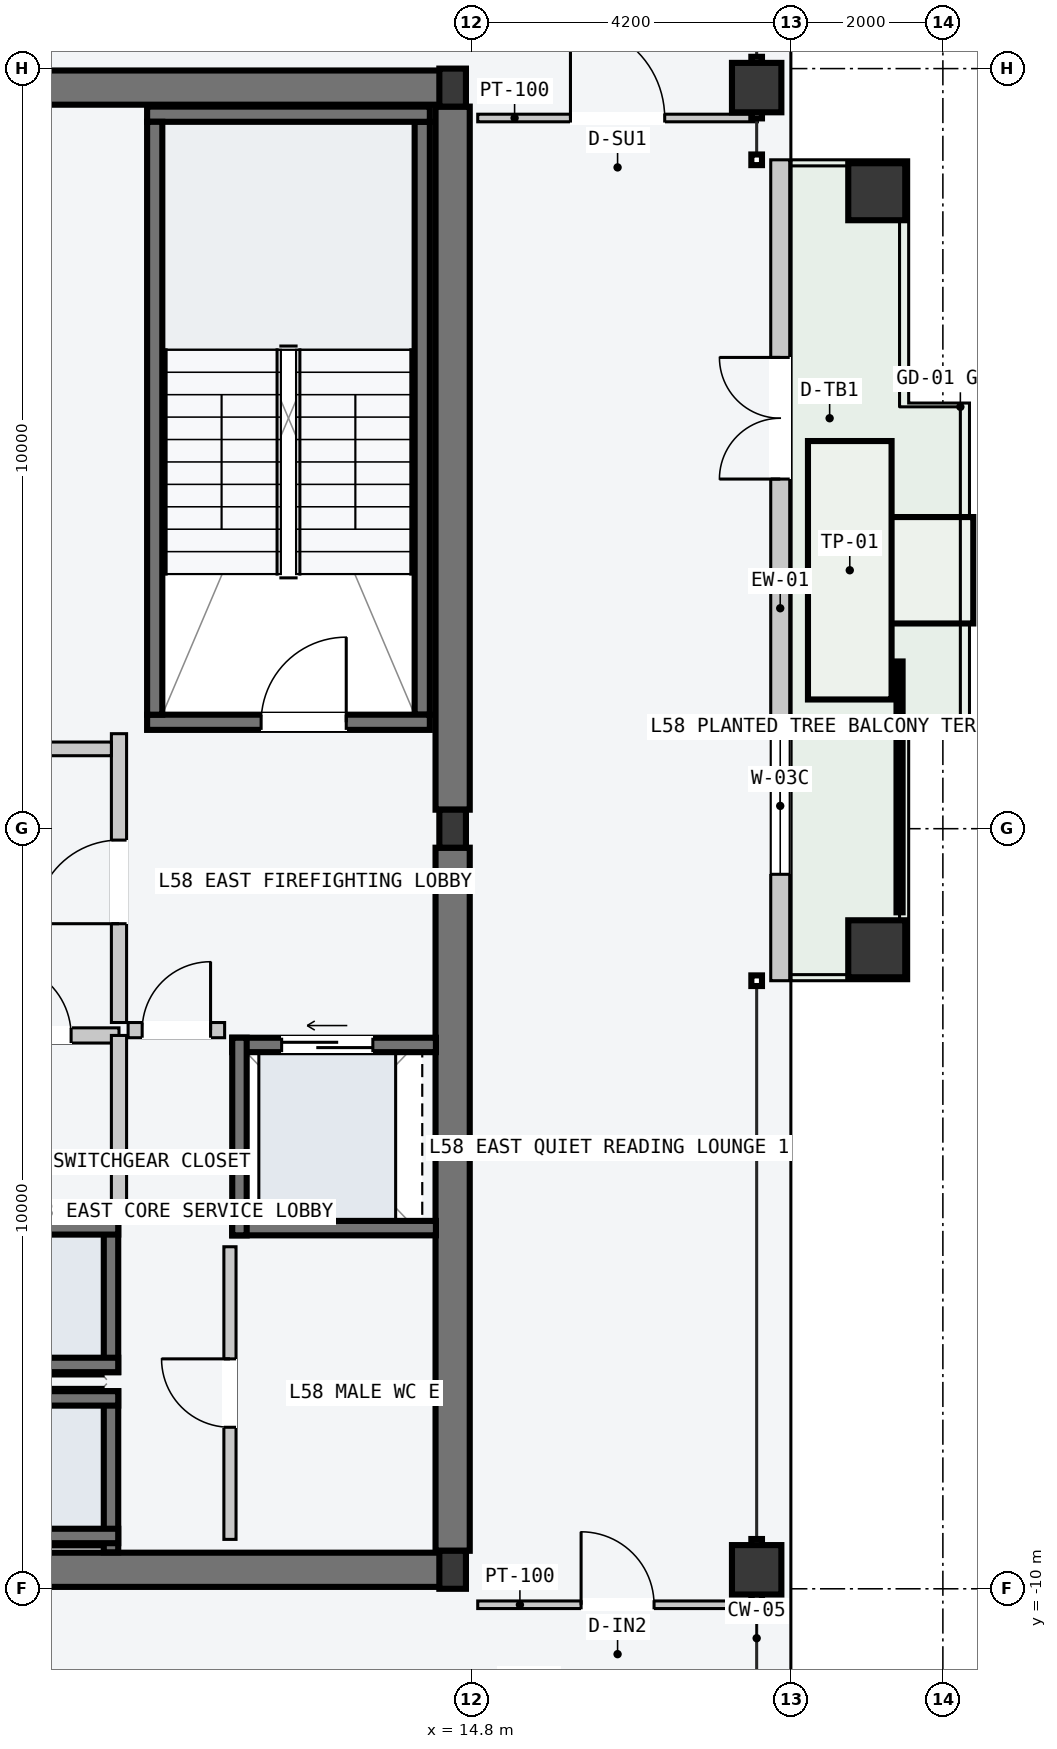
"""IFC4 building model, lengths in metres.
Left out: names, types, materials, properties, quantities, classifications, styles, units other than length and angle.
Written with IfcOpenShell. Run it as: python <this file> out.ifc"""

import sys

from ifc_helpers import new_model, si_unit, direction, frame, frame_2d, origin, origin_2d, place, context, subcontext, project, spatial, rectangle, hollow_rectangle, i_section, extrude, element, fill, save


model = new_model("IFC4")
c1 = context("Model", 3, precision=1e-05, world=origin(), true_north=direction((0.0, 1.0)))
c2 = subcontext(c1, "Body", "Model", "MODEL_VIEW")
j1 = project(units=[si_unit("LENGTHUNIT", "METRE"), si_unit("PLANEANGLEUNIT", "RADIAN")], contexts=[c1])
p1 = place(None, origin())
s1 = spatial("IfcSite", under=j1, at=p1, CompositionType="ELEMENT")
p2 = place(p1, origin())
s2 = spatial("IfcBuilding", under=s1, at=p2, CompositionType="ELEMENT")
p3 = place(p2, frame((0.0, 0.0, 222.0)))
s3 = spatial("IfcBuildingStorey", under=s2, at=p3, CompositionType="ELEMENT", Elevation=222.0)
for number, where, z_axis, x_axis in (
    (1, (8.07, -9.75, -0.2), (0.0, 0.0, 1.0), (1.0, 0.0, 0.0)),
    (2, (8.07, 9.75, -0.2), (0.0, 0.0, 1.0), (1.0, 0.0, 0.0)),
):
    element("IfcWall", number, at=place(p3, frame(where, z_axis=z_axis, x_axis=x_axis)), inside=s3, PredefinedType="SHEAR", context=c2, shape_type="SweptSolid", body=[
        extrude(rectangle(XDim=6.46, YDim=0.45, at=frame_2d((3.23, 0.0))), origin(), (0.0, 0.0, 1.0), 3.6),
    ])
for number, where, z_axis, x_axis in (
    (3, (14.55, -9.5, -0.2), (0.0, 0.0, 1.0), (0.0, 1.0, 0.0)),
    (4, (14.55, 0.25, -0.2), (0.0, 0.0, 1.0), (0.0, 1.0, 0.0)),
):
    element("IfcWall", number, at=place(p3, frame(where, z_axis=z_axis, x_axis=x_axis)), inside=s3, PredefinedType="SHEAR", context=c2, shape_type="SweptSolid", body=[
        extrude(rectangle(XDim=9.25, YDim=0.45, at=frame_2d((4.625, 0.0))), origin(), (0.0, 0.0, 1.0), 3.6),
    ])
p4 = place(p3, frame((14.15, 1.5, -0.2), z_axis=(0.0, 0.0, 1.0), x_axis=(0.0, 1.0, 0.0)))
e5 = element("IfcWall", 5, at=p4, inside=s3, PredefinedType="SOLIDWALL", context=c2, shape_type="SweptSolid", body=[
    extrude(rectangle(XDim=7.8, YDim=0.2, at=frame_2d((3.9, 0.0))), origin(), (0.0, 0.0, 1.0), 3.6),
])
p5 = place(p3, frame((10.53, 1.4, -0.2), z_axis=(0.0, 0.0, 1.0), x_axis=(1.0, 0.0, 0.0)))
e6 = element("IfcWall", 6, at=p5, inside=s3, PredefinedType="SOLIDWALL", context=c2, shape_type="SweptSolid", body=[
    extrude(rectangle(XDim=3.72, YDim=0.2, at=frame_2d((1.86, 0.0))), origin(), (0.0, 0.0, 1.0), 3.6),
])
p6 = place(p5, frame((1.5, 0.0, 0.2)))
e7 = element("IfcOpeningElement", 7, at=p6, cuts=e6, PredefinedType="OPENING", context=c2, shape_type="SweptSolid", body=[
    extrude(rectangle(XDim=1.12, YDim=2.18, at=frame_2d((0.56, 1.09))), frame((0.0, 0.11, 0.0), z_axis=(0.0, -1.0, 0.0), x_axis=(1.0, 0.0, 0.0)), (0.0, 0.0, 1.0), 0.22),
])
p7 = place(p3, frame((10.53, 9.4, -0.2), z_axis=(0.0, 0.0, 1.0), x_axis=(1.0, 0.0, 0.0)))
e8 = element("IfcWall", 8, at=p7, inside=s3, PredefinedType="SOLIDWALL", context=c2, shape_type="SweptSolid", body=[
    extrude(rectangle(XDim=3.72, YDim=0.2, at=frame_2d((1.86, 0.0))), origin(), (0.0, 0.0, 1.0), 3.6),
])
p8 = place(p3, frame((10.63, 1.5, -0.2), z_axis=(0.0, 0.0, 1.0), x_axis=(0.0, 1.0, 0.0)))
e9 = element("IfcWall", 9, at=p8, inside=s3, PredefinedType="SOLIDWALL", context=c2, shape_type="SweptSolid", body=[
    extrude(rectangle(XDim=7.8, YDim=0.2, at=frame_2d((3.9, 0.0))), origin(), (0.0, 0.0, 1.0), 3.6),
])
for number, where, z_axis, x_axis in (
    (10, (14.55, -9.75, 0.0), (0.0, 0.0, 1.0), (1.0, 0.0, 0.0)),
    (11, (14.55, 0.0, 0.0), (0.0, 0.0, 1.0), (1.0, 0.0, 0.0)),
    (12, (14.55, 9.75, 0.0), (0.0, 0.0, 1.0), (1.0, 0.0, 0.0)),
):
    element("IfcColumn", number, at=place(p3, frame(where, z_axis=z_axis, x_axis=x_axis)), inside=s3, PredefinedType="COLUMN", context=c2, shape_type="SweptSolid", body=[
        extrude(i_section(OverallWidth=0.35, OverallDepth=0.5, WebThickness=0.02, FlangeThickness=0.032, at=origin_2d()), origin(), (0.0, 0.0, 1.0), 3.6),
    ])
for number, where, z_axis, x_axis in (
    (13, (18.55, -9.75, 0.0), (0.0, 0.0, 1.0), (0.0, 1.0, 0.0)),
    (14, (18.55, 9.75, 0.0), (0.0, 0.0, 1.0), (0.0, 1.0, 0.0)),
):
    element("IfcColumn", number, at=place(p3, frame(where, z_axis=z_axis, x_axis=x_axis)), inside=s3, PredefinedType="COLUMN", context=c2, shape_type="SweptSolid", body=[
        extrude(hollow_rectangle(XDim=0.65, YDim=0.65, WallThickness=0.028, at=origin_2d()), origin(), (0.0, 0.0, 1.0), 3.6),
    ])
for number, where, z_axis, x_axis in (
    (15, (20.13, -1.58, -0.2), (0.0, 0.0, 1.0), (0.0, 1.0, 0.0)),
    (16, (20.13, 8.38, -0.2), (0.0, 0.0, 1.0), (0.0, 1.0, 0.0)),
):
    element("IfcColumn", number, at=place(p3, frame(where, z_axis=z_axis, x_axis=x_axis)), inside=s3, PredefinedType="COLUMN", context=c2, shape_type="SweptSolid", body=[
        extrude(hollow_rectangle(XDim=0.75, YDim=0.75, WallThickness=0.032, at=origin_2d()), origin(), (0.0, 0.0, 1.0), 3.8),
    ])
p9 = place(p3, frame((18.86, -2.0, 0.0), z_axis=(0.0, 0.0, 1.0), x_axis=(0.0, 1.0, 0.0)))
e17 = element("IfcWall", 17, at=p9, inside=s3, PredefinedType="STANDARD", context=c2, shape_type="SweptSolid", body=[
    extrude(rectangle(XDim=10.8, YDim=0.25, at=frame_2d((5.4, 0.0))), origin(), (0.0, 0.0, 1.0), 3.4),
])
p10 = place(p9, frame((6.6, 0.0, 0.0)))
e18 = element("IfcOpeningElement", 18, at=p10, cuts=e17, PredefinedType="OPENING", context=c2, shape_type="SweptSolid", body=[
    extrude(rectangle(XDim=1.6, YDim=2.2, at=frame_2d((0.8, 1.1))), frame((0.0, 0.135, 0.0), z_axis=(0.0, -1.0, 0.0), x_axis=(1.0, 0.0, 0.0)), (0.0, 0.0, 1.0), 0.27),
])
p11 = place(p9, frame((1.4, 0.0, 0.85)))
e19 = element("IfcOpeningElement", 19, at=p11, cuts=e17, PredefinedType="OPENING", context=c2, shape_type="SweptSolid", body=[
    extrude(rectangle(XDim=1.8, YDim=2.05, at=frame_2d((0.9, 1.025))), frame((0.0, 0.135, 0.0), z_axis=(0.0, -1.0, 0.0), x_axis=(1.0, 0.0, 0.0)), (0.0, 0.0, 1.0), 0.27),
])
p12 = place(p3, frame((10.055, -9.52, -0.2), z_axis=(0.0, 0.0, 1.0), x_axis=(0.0, 1.0, 0.0)))
e20 = element("IfcWall", 20, at=p12, inside=s3, PredefinedType="SOLIDWALL", context=c2, shape_type="SweptSolid", body=[
    extrude(rectangle(XDim=2.12, YDim=0.19, at=frame_2d((1.06, 0.0))), origin(), (0.0, 0.0, 1.0), 3.6),
])
for number, where, z_axis, x_axis in (
    (21, (7.95, -7.495, -0.2), (0.0, 0.0, 1.0), (1.0, 0.0, 0.0)),
    (22, (7.95, -9.305, -0.2), (0.0, 0.0, 1.0), (1.0, 0.0, 0.0)),
):
    element("IfcWall", number, at=place(p3, frame(where, z_axis=z_axis, x_axis=x_axis)), inside=s3, PredefinedType="SOLIDWALL", context=c2, shape_type="SweptSolid", body=[
        extrude(rectangle(XDim=2.2, YDim=0.19, at=frame_2d((1.1, 0.0))), origin(), (0.0, 0.0, 1.0), 3.6),
    ])
p13 = place(p3, frame((10.055, -7.15, -0.2), z_axis=(0.0, 0.0, 1.0), x_axis=(0.0, 1.0, 0.0)))
e23 = element("IfcWall", 23, at=p13, inside=s3, PredefinedType="SOLIDWALL", context=c2, shape_type="SweptSolid", body=[
    extrude(rectangle(XDim=2.0, YDim=0.19, at=frame_2d((1.0, 0.0))), origin(), (0.0, 0.0, 1.0), 3.6),
])
for number, where, z_axis, x_axis in (
    (24, (7.95, -5.245, -0.2), (0.0, 0.0, 1.0), (1.0, 0.0, 0.0)),
    (25, (7.95, -7.055, -0.2), (0.0, 0.0, 1.0), (1.0, 0.0, 0.0)),
):
    element("IfcWall", number, at=place(p3, frame(where, z_axis=z_axis, x_axis=x_axis)), inside=s3, PredefinedType="SOLIDWALL", context=c2, shape_type="SweptSolid", body=[
        extrude(rectangle(XDim=2.2, YDim=0.19, at=frame_2d((1.1, 0.0))), origin(), (0.0, 0.0, 1.0), 3.6),
    ])
p14 = place(p3, frame((11.65, -2.845, -0.2), z_axis=(0.0, 0.0, 1.0), x_axis=(1.0, 0.0, 0.0)))
e26 = element("IfcWall", 26, at=p14, inside=s3, PredefinedType="SOLIDWALL", context=c2, shape_type="SweptSolid", body=[
    extrude(rectangle(XDim=2.68, YDim=0.19, at=frame_2d((1.34, 0.0))), origin(), (0.0, 0.0, 1.0), 3.6),
])
p15 = place(p14, frame((0.65, 0.0, 0.2)))
e27 = element("IfcOpeningElement", 27, at=p15, cuts=e26, PredefinedType="OPENING", context=c2, shape_type="SweptSolid", body=[
    extrude(rectangle(XDim=1.2, YDim=2.2, at=frame_2d((0.6, 1.1))), frame((0.0, 0.105, 0.0), z_axis=(0.0, -1.0, 0.0), x_axis=(1.0, 0.0, 0.0)), (0.0, 0.0, 1.0), 0.21),
])
p16 = place(p3, frame((11.65, -5.255, -0.2), z_axis=(0.0, 0.0, 1.0), x_axis=(1.0, 0.0, 0.0)))
e28 = element("IfcWall", 28, at=p16, inside=s3, PredefinedType="SOLIDWALL", context=c2, shape_type="SweptSolid", body=[
    extrude(rectangle(XDim=2.68, YDim=0.19, at=frame_2d((1.34, 0.0))), origin(), (0.0, 0.0, 1.0), 3.6),
])
p17 = place(p3, frame((11.745, -5.35, -0.2), z_axis=(0.0, 0.0, 1.0), x_axis=(0.0, 1.0, 0.0)))
e29 = element("IfcWall", 29, at=p17, inside=s3, PredefinedType="SOLIDWALL", context=c2, shape_type="SweptSolid", body=[
    extrude(rectangle(XDim=2.6, YDim=0.19, at=frame_2d((1.3, 0.0))), origin(), (0.0, 0.0, 1.0), 3.6),
])
p18 = place(p3, frame((10.16, -2.55, 0.0), z_axis=(0.0, 0.0, 1.0), x_axis=(0.0, 1.0, 0.0)))
e30 = element("IfcWall", 30, at=p18, inside=s3, PredefinedType="PARTITIONING", context=c2, shape_type="SweptSolid", body=[
    extrude(rectangle(XDim=3.8, YDim=0.2, at=frame_2d((1.9, 0.0))), origin(), (0.0, 0.0, 1.0), 3.4),
])
p19 = place(p18, frame((1.3, 0.0, 0.0)))
e31 = element("IfcOpeningElement", 31, at=p19, cuts=e30, PredefinedType="OPENING", context=c2, shape_type="SweptSolid", body=[
    extrude(rectangle(XDim=1.1, YDim=2.15, at=frame_2d((0.55, 1.075))), frame((0.0, 0.11, 0.0), z_axis=(0.0, -1.0, 0.0), x_axis=(1.0, 0.0, 0.0)), (0.0, 0.0, 1.0), 0.22),
])
p20 = place(p3, frame((10.28, -2.65, 0.0), z_axis=(0.0, 0.0, 1.0), x_axis=(1.0, 0.0, 0.0)))
e32 = element("IfcWall", 32, at=p20, inside=s3, PredefinedType="PARTITIONING", context=c2, shape_type="SweptSolid", body=[
    extrude(rectangle(XDim=1.27, YDim=0.2, at=frame_2d((0.635, 0.0))), origin(), (0.0, 0.0, 1.0), 3.4),
])
p21 = place(p20, frame((0.185, 0.0, 0.0)))
e33 = element("IfcOpeningElement", 33, at=p21, cuts=e32, PredefinedType="OPENING", context=c2, shape_type="SweptSolid", body=[
    extrude(rectangle(XDim=0.9, YDim=2.15, at=frame_2d((0.45, 1.075))), frame((0.0, 0.11, 0.0), z_axis=(0.0, -1.0, 0.0), x_axis=(1.0, 0.0, 0.0)), (0.0, 0.0, 1.0), 0.22),
])
p22 = place(p3, frame((7.96, -2.72, 0.0), z_axis=(0.0, 0.0, 1.0), x_axis=(1.0, 0.0, 0.0)))
e34 = element("IfcWall", 34, at=p22, inside=s3, PredefinedType="PARTITIONING", context=c2, shape_type="SweptSolid", body=[
    extrude(rectangle(XDim=2.2, YDim=0.2, at=frame_2d((1.1, 0.0))), origin(), (0.0, 0.0, 1.0), 3.4),
])
p23 = place(p22, frame((0.62, 0.0, 0.0)))
e35 = element("IfcOpeningElement", 35, at=p23, cuts=e34, PredefinedType="OPENING", context=c2, shape_type="SweptSolid", body=[
    extrude(rectangle(XDim=0.95, YDim=2.1, at=frame_2d((0.475, 1.05))), frame((0.0, 0.11, 0.0), z_axis=(0.0, -1.0, 0.0), x_axis=(1.0, 0.0, 0.0)), (0.0, 0.0, 1.0), 0.22),
])
p24 = place(p3, frame((10.16, -5.16, 0.0), z_axis=(0.0, 0.0, 1.0), x_axis=(0.0, 1.0, 0.0)))
e36 = element("IfcWall", 36, at=p24, inside=s3, PredefinedType="PARTITIONING", context=c2, shape_type="SweptSolid", body=[
    extrude(rectangle(XDim=2.44, YDim=0.2, at=frame_2d((1.22, 0.0))), origin(), (0.0, 0.0, 1.0), 3.4),
])
p25 = place(p3, frame((11.62, -9.35, 0.0), z_axis=(0.0, 0.0, 1.0), x_axis=(0.0, 1.0, 0.0)))
e37 = element("IfcWall", 37, at=p25, inside=s3, PredefinedType="PARTITIONING", context=c2, shape_type="SweptSolid", body=[
    extrude(rectangle(XDim=3.85, YDim=0.16, at=frame_2d((1.925, 0.0))), origin(), (0.0, 0.0, 1.0), 3.4),
])
p26 = place(p25, frame((1.475, 0.0, 0.0)))
e38 = element("IfcOpeningElement", 38, at=p26, cuts=e37, PredefinedType="OPENING", context=c2, shape_type="SweptSolid", body=[
    extrude(rectangle(XDim=0.9, YDim=2.15, at=frame_2d((0.45, 1.075))), frame((0.0, 0.09, 0.0), z_axis=(0.0, -1.0, 0.0), x_axis=(1.0, 0.0, 0.0)), (0.0, 0.0, 1.0), 0.18),
])
p27 = place(p3, frame((1.26, 1.05, 0.0), z_axis=(0.0, 0.0, 1.0), x_axis=(1.0, 0.0, 0.0)))
e39 = element("IfcWall", 39, at=p27, inside=s3, PredefinedType="PARTITIONING", context=c2, shape_type="SweptSolid", body=[
    extrude(rectangle(XDim=8.8, YDim=0.18, at=frame_2d((4.4, 0.0))), origin(), (0.0, 0.0, 1.0), 3.4),
])
p28 = place(p3, frame((14.88, 9.35, 0.0), z_axis=(0.0, 0.0, 1.0), x_axis=(1.0, 0.0, 0.0)))
e40 = element("IfcWall", 40, at=p28, inside=s3, PredefinedType="PARTITIONING", context=c2, shape_type="SweptSolid", body=[
    extrude(rectangle(XDim=3.68, YDim=0.1, at=frame_2d((1.84, 0.0))), origin(), (0.0, 0.0, 1.0), 3.4),
])
p29 = place(p28, frame((1.22, 0.0, 0.0)))
e41 = element("IfcOpeningElement", 41, at=p29, cuts=e40, PredefinedType="OPENING", context=c2, shape_type="SweptSolid", body=[
    extrude(rectangle(XDim=1.24, YDim=2.24, at=frame_2d((0.62, 1.12))), frame((0.0, 0.06, 0.0), z_axis=(0.0, -1.0, 0.0), x_axis=(1.0, 0.0, 0.0)), (0.0, 0.0, 1.0), 0.12),
])
p30 = place(p3, frame((14.88, -10.21, 0.0), z_axis=(0.0, 0.0, 1.0), x_axis=(1.0, 0.0, 0.0)))
e42 = element("IfcWall", 42, at=p30, inside=s3, PredefinedType="PARTITIONING", context=c2, shape_type="SweptSolid", body=[
    extrude(rectangle(XDim=3.68, YDim=0.1, at=frame_2d((1.84, 0.0))), origin(), (0.0, 0.0, 1.0), 3.4),
])
p31 = place(p30, frame((1.36, 0.0, 0.0)))
e43 = element("IfcOpeningElement", 43, at=p31, cuts=e42, PredefinedType="OPENING", context=c2, shape_type="SweptSolid", body=[
    extrude(rectangle(XDim=0.96, YDim=2.18, at=frame_2d((0.48, 1.09))), frame((0.0, 0.06, 0.0), z_axis=(0.0, -1.0, 0.0), x_axis=(1.0, 0.0, 0.0)), (0.0, 0.0, 1.0), 0.12),
])
p32 = place(p6, origin())
e44 = element("IfcDoor", 44, at=p32, inside=s3, OperationType="SINGLE_SWING_RIGHT", PredefinedType="DOOR", context=c2, shape_type="SweptSolid", body=[
    extrude(rectangle(XDim=1.12, YDim=2.18, at=frame_2d((0.56, 1.09))), frame((0.0, 0.025, 0.0), z_axis=(0.0, -1.0, 0.0), x_axis=(1.0, 0.0, 0.0)), (0.0, 0.0, 1.0), 0.05),
])
fill(e7, e44)
p33 = place(p10, origin())
e45 = element("IfcDoor", 45, at=p33, inside=s3, OperationType="DOUBLE_DOOR_SINGLE_SWING", PredefinedType="DOOR", context=c2, shape_type="SweptSolid", body=[
    extrude(rectangle(XDim=1.6, YDim=2.2, at=frame_2d((0.8, 1.1))), frame((0.0, 0.025, 0.0), z_axis=(0.0, -1.0, 0.0), x_axis=(1.0, 0.0, 0.0)), (0.0, 0.0, 1.0), 0.05),
])
fill(e18, e45)
p34 = place(p11, origin())
e46 = element("IfcWindow", 46, at=p34, inside=s3, PartitioningType="SINGLE_PANEL", PredefinedType="WINDOW", context=c2, shape_type="SweptSolid", body=[
    extrude(rectangle(XDim=1.8, YDim=2.05, at=frame_2d((0.9, 1.025))), frame((0.0, 0.03, 0.0), z_axis=(0.0, -1.0, 0.0), x_axis=(1.0, 0.0, 0.0)), (0.0, 0.0, 1.0), 0.06),
])
fill(e19, e46)
p35 = place(p15, origin())
e47 = element("IfcDoor", 47, at=p35, inside=s3, OperationType="SLIDING_TO_LEFT", PredefinedType="DOOR", context=c2, shape_type="SweptSolid", body=[
    extrude(rectangle(XDim=1.2, YDim=2.2, at=frame_2d((0.6, 1.1))), frame((0.0, 0.025, 0.0), z_axis=(0.0, -1.0, 0.0), x_axis=(1.0, 0.0, 0.0)), (0.0, 0.0, 1.0), 0.05),
])
fill(e27, e47)
p36 = place(p19, origin())
e48 = element("IfcDoor", 48, at=p36, inside=s3, OperationType="SINGLE_SWING_LEFT", PredefinedType="DOOR", context=c2, shape_type="SweptSolid", body=[
    extrude(rectangle(XDim=1.1, YDim=2.15, at=frame_2d((0.55, 1.075))), frame((0.0, 0.025, 0.0), z_axis=(0.0, -1.0, 0.0), x_axis=(1.0, 0.0, 0.0)), (0.0, 0.0, 1.0), 0.05),
])
fill(e31, e48)
p37 = place(p21, origin())
e49 = element("IfcDoor", 49, at=p37, inside=s3, OperationType="SINGLE_SWING_RIGHT", PredefinedType="DOOR", context=c2, shape_type="SweptSolid", body=[
    extrude(rectangle(XDim=0.9, YDim=2.15, at=frame_2d((0.45, 1.075))), frame((0.0, 0.025, 0.0), z_axis=(0.0, -1.0, 0.0), x_axis=(1.0, 0.0, 0.0)), (0.0, 0.0, 1.0), 0.05),
])
fill(e33, e49)
p38 = place(p23, origin())
e50 = element("IfcDoor", 50, at=p38, inside=s3, OperationType="SINGLE_SWING_LEFT", PredefinedType="DOOR", context=c2, shape_type="SweptSolid", body=[
    extrude(rectangle(XDim=0.95, YDim=2.1, at=frame_2d((0.475, 1.05))), frame((0.0, 0.025, 0.0), z_axis=(0.0, -1.0, 0.0), x_axis=(1.0, 0.0, 0.0)), (0.0, 0.0, 1.0), 0.05),
])
fill(e35, e50)
p39 = place(p26, origin())
e51 = element("IfcDoor", 51, at=p39, inside=s3, OperationType="SINGLE_SWING_RIGHT", PredefinedType="DOOR", context=c2, shape_type="SweptSolid", body=[
    extrude(rectangle(XDim=0.9, YDim=2.15, at=frame_2d((0.45, 1.075))), frame((0.0, 0.025, 0.0), z_axis=(0.0, -1.0, 0.0), x_axis=(1.0, 0.0, 0.0)), (0.0, 0.0, 1.0), 0.05),
])
fill(e38, e51)
p40 = place(p29, origin())
e52 = element("IfcDoor", 52, at=p40, inside=s3, OperationType="SINGLE_SWING_LEFT", PredefinedType="DOOR", context=c2, shape_type="SweptSolid", body=[
    extrude(rectangle(XDim=1.24, YDim=2.24, at=frame_2d((0.62, 1.12))), frame((0.0, 0.025, 0.0), z_axis=(0.0, -1.0, 0.0), x_axis=(1.0, 0.0, 0.0)), (0.0, 0.0, 1.0), 0.05),
])
fill(e41, e52)
p41 = place(p31, origin())
e53 = element("IfcDoor", 53, at=p41, inside=s3, OperationType="SINGLE_SWING_LEFT", PredefinedType="DOOR", context=c2, shape_type="SweptSolid", body=[
    extrude(rectangle(XDim=0.96, YDim=2.18, at=frame_2d((0.48, 1.09))), frame((0.0, 0.025, 0.0), z_axis=(0.0, -1.0, 0.0), x_axis=(1.0, 0.0, 0.0)), (0.0, 0.0, 1.0), 0.05),
])
fill(e43, e53)
save(model, sys.argv[1])
